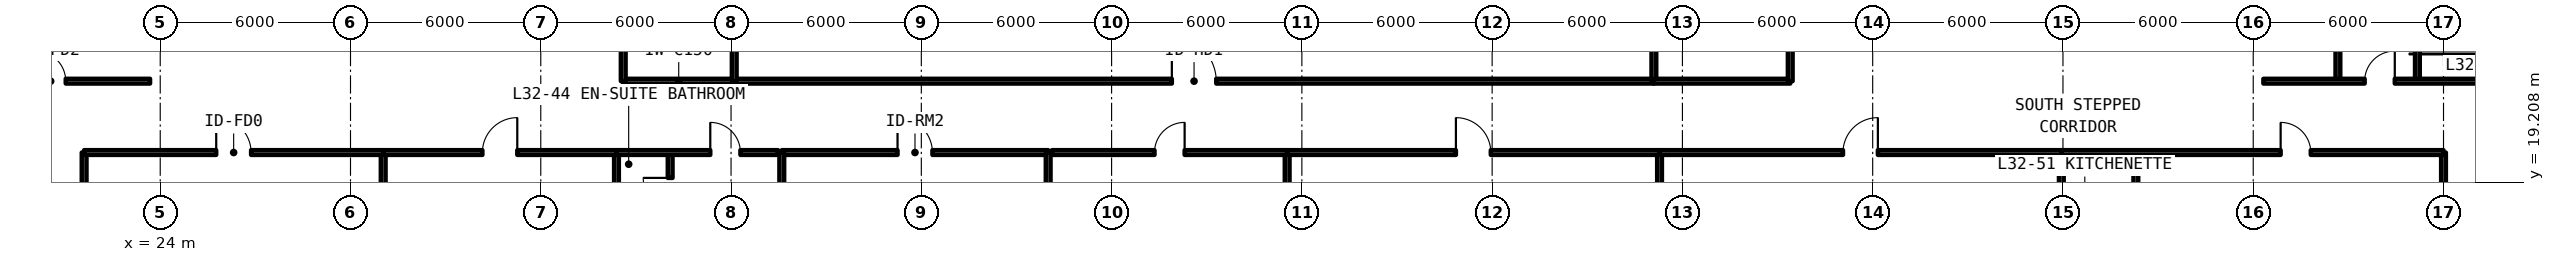
"""IFC4 building model, lengths in metres.
Left out: names, types, materials, properties, quantities, classifications, styles, units other than length and angle.
Written with IfcOpenShell. Run it as: python <this file> out.ifc"""

import sys

from ifc_helpers import new_model, si_unit, direction, frame, frame_2d, origin, place, context, subcontext, project, spatial, rectangle, extrude, element, fill, save


model = new_model("IFC4")
c1 = context("Model", 3, precision=1e-05, world=origin(), true_north=direction((0.0, 1.0)))
c2 = subcontext(c1, "Body", "Model", "MODEL_VIEW")
j1 = project(units=[si_unit("LENGTHUNIT", "METRE"), si_unit("PLANEANGLEUNIT", "RADIAN")], contexts=[c1])
p1 = place(None, origin())
s1 = spatial("IfcSite", under=j1, at=p1, CompositionType="ELEMENT")
p2 = place(p1, origin())
s2 = spatial("IfcBuilding", under=s1, at=p2, CompositionType="ELEMENT")
p3 = place(p2, frame((0.0, 0.0, 115.83)))
s3 = spatial("IfcBuildingStorey", under=s2, at=p3, CompositionType="ELEMENT", Elevation=115.83)
p4 = place(p3, frame((38.6, 22.4, 0.0), z_axis=(0.0, 0.0, 1.0), x_axis=(1.0, 0.0, 0.0)))
e1 = element("IfcWall", 1, at=p4, inside=s3, PredefinedType="SOLIDWALL", context=c2, shape_type="SweptSolid", body=[
    extrude(rectangle(XDim=3.5, YDim=0.15, at=frame_2d((1.75, 0.0))), origin(), (0.0, 0.0, 1.0), 2.63),
])
p5 = place(p3, frame((38.6, 22.4, 0.0), z_axis=(0.0, 0.0, 1.0), x_axis=(0.0, 1.0, 0.0)))
e2 = element("IfcWall", 2, at=p5, inside=s3, PredefinedType="SOLIDWALL", context=c2, shape_type="SweptSolid", body=[
    extrude(rectangle(XDim=9.0, YDim=0.15, at=frame_2d((4.5, 0.0))), origin(), (0.0, 0.0, 1.0), 2.63),
])
p6 = place(p5, frame((4.025, 0.0, 0.0)))
e3 = element("IfcOpeningElement", 3, at=p6, cuts=e2, PredefinedType="OPENING", context=c2, shape_type="SweptSolid", body=[
    extrude(rectangle(XDim=0.95, YDim=2.15, at=frame_2d((0.475, 1.075))), frame((0.0, 0.085, 0.0), z_axis=(0.0, -1.0, 0.0), x_axis=(1.0, 0.0, 0.0)), (0.0, 0.0, 1.0), 0.17),
])
p7 = place(p3, frame((42.1, 22.4, 0.0), z_axis=(0.0, 0.0, 1.0), x_axis=(1.0, 0.0, 0.0)))
e4 = element("IfcWall", 4, at=p7, inside=s3, PredefinedType="SOLIDWALL", context=c2, shape_type="SweptSolid", body=[
    extrude(rectangle(XDim=29.0, YDim=0.15, at=frame_2d((14.5, 0.0))), origin(), (0.0, 0.0, 1.0), 2.63),
])
p8 = place(p7, frame((13.8, 0.0, 0.0)))
e5 = element("IfcOpeningElement", 5, at=p8, cuts=e4, PredefinedType="OPENING", context=c2, shape_type="SweptSolid", body=[
    extrude(rectangle(XDim=1.4, YDim=2.15, at=frame_2d((0.7, 1.075))), frame((0.0, 0.085, 0.0), z_axis=(0.0, -1.0, 0.0), x_axis=(1.0, 0.0, 0.0)), (0.0, 0.0, 1.0), 0.17),
])
for number, where, z_axis, x_axis in (
    (6, (42.1, 22.4, 0.0), (0.0, 0.0, 1.0), (0.0, 1.0, 0.0)),
    (7, (71.1, 22.4, 0.0), (0.0, 0.0, 1.0), (0.0, 1.0, 0.0)),
):
    element("IfcWall", number, at=place(p3, frame(where, z_axis=z_axis, x_axis=x_axis)), inside=s3, PredefinedType="SOLIDWALL", context=c2, shape_type="SweptSolid", body=[
        extrude(rectangle(XDim=22.4, YDim=0.15, at=frame_2d((11.2, 0.0))), origin(), (0.0, 0.0, 1.0), 2.63),
    ])
p9 = place(p3, frame((71.1, 22.4, 0.0), z_axis=(0.0, 0.0, 1.0), x_axis=(1.0, 0.0, 0.0)))
e8 = element("IfcWall", 8, at=p9, inside=s3, PredefinedType="SOLIDWALL", context=c2, shape_type="SweptSolid", body=[
    extrude(rectangle(XDim=4.3, YDim=0.15, at=frame_2d((2.15, 0.0))), origin(), (0.0, 0.0, 1.0), 2.63),
])
p10 = place(p3, frame((75.4, 22.4, 0.0), z_axis=(0.0, 0.0, 1.0), x_axis=(0.0, 1.0, 0.0)))
e9 = element("IfcWall", 9, at=p10, inside=s3, PredefinedType="SOLIDWALL", context=c2, shape_type="SweptSolid", body=[
    extrude(rectangle(XDim=13.2, YDim=0.15, at=frame_2d((6.6, 0.0))), origin(), (0.0, 0.0, 1.0), 2.63),
])
p11 = place(p10, frame((6.125, 0.0, 0.0)))
e10 = element("IfcOpeningElement", 10, at=p11, cuts=e9, PredefinedType="OPENING", context=c2, shape_type="SweptSolid", body=[
    extrude(rectangle(XDim=0.95, YDim=2.15, at=frame_2d((0.475, 1.075))), frame((0.0, 0.085, 0.0), z_axis=(0.0, -1.0, 0.0), x_axis=(1.0, 0.0, 0.0)), (0.0, 0.0, 1.0), 0.17),
])
p12 = place(p3, frame((17.41, 22.4, 0.0), z_axis=(0.0, 0.0, 1.0), x_axis=(1.0, 0.0, 0.0)))
e11 = element("IfcWall", 11, at=p12, inside=s3, PredefinedType="SOLIDWALL", context=c2, shape_type="SweptSolid", body=[
    extrude(rectangle(XDim=6.27, YDim=0.15, at=frame_2d((3.135, 0.0))), origin(), (0.0, 0.0, 1.0), 2.63),
])
p13 = place(p12, frame((2.66, 0.0, 0.0)))
e12 = element("IfcOpeningElement", 12, at=p13, cuts=e11, PredefinedType="OPENING", context=c2, shape_type="SweptSolid", body=[
    extrude(rectangle(XDim=0.95, YDim=2.15, at=frame_2d((0.475, 1.075))), frame((0.0, 0.085, 0.0), z_axis=(0.0, -1.0, 0.0), x_axis=(1.0, 0.0, 0.0)), (0.0, 0.0, 1.0), 0.17),
])
p14 = place(p3, frame((95.177, 22.4, 0.0), z_axis=(0.0, 0.0, 1.0), x_axis=(0.0, 1.0, 0.0)))
e13 = element("IfcWall", 13, at=p14, inside=s3, PredefinedType="PARTITIONING", context=c2, shape_type="SweptSolid", body=[
    extrude(rectangle(XDim=17.2, YDim=0.15, at=frame_2d((8.6, 0.0))), origin(), (0.0, 0.0, 1.0), 2.63),
])
p15 = place(p14, frame((8.175, 0.0, 0.0)))
e14 = element("IfcOpeningElement", 14, at=p15, cuts=e13, PredefinedType="OPENING", context=c2, shape_type="SweptSolid", body=[
    extrude(rectangle(XDim=0.85, YDim=2.1, at=frame_2d((0.425, 1.05))), frame((0.0, 0.085, 0.0), z_axis=(0.0, -1.0, 0.0), x_axis=(1.0, 0.0, 0.0)), (0.0, 0.0, 1.0), 0.17),
])
p16 = place(p3, frame((92.67, 22.4, 0.0), z_axis=(0.0, 0.0, 1.0), x_axis=(0.0, 1.0, 0.0)))
e15 = element("IfcWall", 15, at=p16, inside=s3, PredefinedType="PARTITIONING", context=c2, shape_type="SweptSolid", body=[
    extrude(rectangle(XDim=17.2, YDim=0.15, at=frame_2d((8.6, 0.0))), origin(), (0.0, 0.0, 1.0), 2.63),
])
p17 = place(p16, frame((4.649, 0.0, 0.0)))
e16 = element("IfcOpeningElement", 16, at=p17, cuts=e15, PredefinedType="OPENING", context=c2, shape_type="SweptSolid", body=[
    extrude(rectangle(XDim=0.85, YDim=2.1, at=frame_2d((0.425, 1.05))), frame((0.0, 0.085, 0.0), z_axis=(0.0, -1.0, 0.0), x_axis=(1.0, 0.0, 0.0)), (0.0, 0.0, 1.0), 0.17),
])
p18 = place(p16, frame((13.249, 0.0, 0.0)))
e17 = element("IfcOpeningElement", 17, at=p18, cuts=e15, PredefinedType="OPENING", context=c2, shape_type="SweptSolid", body=[
    extrude(rectangle(XDim=0.85, YDim=2.1, at=frame_2d((0.425, 1.05))), frame((0.0, 0.085, 0.0), z_axis=(0.0, -1.0, 0.0), x_axis=(1.0, 0.0, 0.0)), (0.0, 0.0, 1.0), 0.17),
])
p19 = place(p3, frame((90.32, 22.4, 0.0), z_axis=(0.0, 0.0, 1.0), x_axis=(1.0, 0.0, 0.0)))
e18 = element("IfcWall", 18, at=p19, inside=s3, PredefinedType="SOLIDWALL", context=c2, shape_type="SweptSolid", body=[
    extrude(rectangle(XDim=9.87, YDim=0.15, at=frame_2d((4.935, 0.0))), origin(), (0.0, 0.0, 1.0), 2.63),
])
p20 = place(p19, frame((3.193, 0.0, 0.0)))
e19 = element("IfcOpeningElement", 19, at=p20, cuts=e18, PredefinedType="OPENING", context=c2, shape_type="SweptSolid", body=[
    extrude(rectangle(XDim=0.95, YDim=2.15, at=frame_2d((0.475, 1.075))), frame((0.0, 0.085, 0.0), z_axis=(0.0, -1.0, 0.0), x_axis=(1.0, 0.0, 0.0)), (0.0, 0.0, 1.0), 0.17),
])
p21 = place(p3, frame((43.6, 20.15, 0.0), z_axis=(0.0, 0.0, 1.0), x_axis=(1.0, 0.0, 0.0)))
e20 = element("IfcWall", 20, at=p21, inside=s3, PredefinedType="SOLIDWALL", context=c2, shape_type="SweptSolid", body=[
    extrude(rectangle(XDim=8.4, YDim=0.15, at=frame_2d((4.2, 0.0))), origin(), (0.0, 0.0, 1.0), 2.63),
])
p22 = place(p21, frame((3.65, 0.0, 0.0)))
e21 = element("IfcOpeningElement", 21, at=p22, cuts=e20, PredefinedType="OPENING", context=c2, shape_type="SweptSolid", body=[
    extrude(rectangle(XDim=1.1, YDim=2.15, at=frame_2d((0.55, 1.075))), frame((0.0, 0.085, 0.0), z_axis=(0.0, -1.0, 0.0), x_axis=(1.0, 0.0, 0.0)), (0.0, 0.0, 1.0), 0.17),
])
for number, where, z_axis, x_axis in (
    (22, (43.6, 9.85, 0.0), (0.0, 0.0, 1.0), (0.0, 1.0, 0.0)),
    (23, (52.0, 9.85, 0.0), (0.0, 0.0, 1.0), (0.0, 1.0, 0.0)),
    (24, (21.6, 9.85, 0.0), (0.0, 0.0, 1.0), (0.0, 1.0, 0.0)),
    (25, (31.031, 9.85, 0.0), (0.0, 0.0, 1.0), (0.0, 1.0, 0.0)),
):
    element("IfcWall", number, at=place(p3, frame(where, z_axis=z_axis, x_axis=x_axis)), inside=s3, PredefinedType="SOLIDWALL", context=c2, shape_type="SweptSolid", body=[
        extrude(rectangle(XDim=10.3, YDim=0.15, at=frame_2d((5.15, 0.0))), origin(), (0.0, 0.0, 1.0), 2.63),
    ])
p23 = place(p3, frame((21.6, 20.15, 0.0), z_axis=(0.0, 0.0, 1.0), x_axis=(1.0, 0.0, 0.0)))
e26 = element("IfcWall", 26, at=p23, inside=s3, PredefinedType="SOLIDWALL", context=c2, shape_type="SweptSolid", body=[
    extrude(rectangle(XDim=9.431, YDim=0.15, at=frame_2d((4.715, 0.0))), origin(), (0.0, 0.0, 1.0), 2.63),
])
p24 = place(p23, frame((4.166, 0.0, 0.0)))
e27 = element("IfcOpeningElement", 27, at=p24, cuts=e26, PredefinedType="OPENING", context=c2, shape_type="SweptSolid", body=[
    extrude(rectangle(XDim=1.1, YDim=2.15, at=frame_2d((0.55, 1.075))), frame((0.0, 0.085, 0.0), z_axis=(0.0, -1.0, 0.0), x_axis=(1.0, 0.0, 0.0)), (0.0, 0.0, 1.0), 0.17),
])
p25 = place(p3, frame((38.387, 9.85, 0.0), z_axis=(0.0, 0.0, 1.0), x_axis=(0.0, 1.0, 0.0)))
e28 = element("IfcWall", 28, at=p25, inside=s3, PredefinedType="SOLIDWALL", context=c2, shape_type="SweptSolid", body=[
    extrude(rectangle(XDim=10.3, YDim=0.15, at=frame_2d((5.15, 0.0))), origin(), (0.0, 0.0, 1.0), 2.63),
])
p26 = place(p3, frame((31.031, 20.15, 0.0), z_axis=(0.0, 0.0, 1.0), x_axis=(1.0, 0.0, 0.0)))
e29 = element("IfcWall", 29, at=p26, inside=s3, PredefinedType="SOLIDWALL", context=c2, shape_type="SweptSolid", body=[
    extrude(rectangle(XDim=7.356, YDim=0.15, at=frame_2d((3.678, 0.0))), origin(), (0.0, 0.0, 1.0), 2.63),
])
p27 = place(p26, frame((3.128, 0.0, 0.0)))
e30 = element("IfcOpeningElement", 30, at=p27, cuts=e29, PredefinedType="OPENING", context=c2, shape_type="SweptSolid", body=[
    extrude(rectangle(XDim=1.1, YDim=2.15, at=frame_2d((0.55, 1.075))), frame((0.0, 0.085, 0.0), z_axis=(0.0, -1.0, 0.0), x_axis=(1.0, 0.0, 0.0)), (0.0, 0.0, 1.0), 0.17),
])
p28 = place(p3, frame((40.08, 9.85, 0.0), z_axis=(0.0, 0.0, 1.0), x_axis=(0.0, 1.0, 0.0)))
e31 = element("IfcWall", 31, at=p28, inside=s3, PredefinedType="PARTITIONING", context=c2, shape_type="SweptSolid", body=[
    extrude(rectangle(XDim=10.3, YDim=0.15, at=frame_2d((5.15, 0.0))), origin(), (0.0, 0.0, 1.0), 2.63),
])
p29 = place(p28, frame((3.0, 0.0, 0.0)))
e32 = element("IfcOpeningElement", 32, at=p29, cuts=e31, PredefinedType="OPENING", context=c2, shape_type="SweptSolid", body=[
    extrude(rectangle(XDim=0.85, YDim=2.1, at=frame_2d((0.425, 1.05))), frame((0.0, 0.085, 0.0), z_axis=(0.0, -1.0, 0.0), x_axis=(1.0, 0.0, 0.0)), (0.0, 0.0, 1.0), 0.17),
])
p30 = place(p28, frame((8.65, 0.0, 0.0)))
e33 = element("IfcOpeningElement", 33, at=p30, cuts=e31, PredefinedType="OPENING", context=c2, shape_type="SweptSolid", body=[
    extrude(rectangle(XDim=0.85, YDim=2.1, at=frame_2d((0.425, 1.05))), frame((0.0, 0.085, 0.0), z_axis=(0.0, -1.0, 0.0), x_axis=(1.0, 0.0, 0.0)), (0.0, 0.0, 1.0), 0.17),
])
p31 = place(p3, frame((38.387, 20.15, 0.0), z_axis=(0.0, 0.0, 1.0), x_axis=(1.0, 0.0, 0.0)))
e34 = element("IfcWall", 34, at=p31, inside=s3, PredefinedType="SOLIDWALL", context=c2, shape_type="SweptSolid", body=[
    extrude(rectangle(XDim=5.093, YDim=0.15, at=frame_2d((2.546, 0.0))), origin(), (0.0, 0.0, 1.0), 2.63),
])
p32 = place(p31, frame((2.958, 0.0, 0.0)))
e35 = element("IfcOpeningElement", 35, at=p32, cuts=e34, PredefinedType="OPENING", context=c2, shape_type="SweptSolid", body=[
    extrude(rectangle(XDim=0.95, YDim=2.15, at=frame_2d((0.475, 1.075))), frame((0.0, 0.085, 0.0), z_axis=(0.0, -1.0, 0.0), x_axis=(1.0, 0.0, 0.0)), (0.0, 0.0, 1.0), 0.17),
])
for number, where, z_axis, x_axis in (
    (36, (96.0, 9.85, 0.0), (0.0, 0.0, 1.0), (0.0, 1.0, 0.0)),
    (37, (59.536, 9.85, 0.0), (0.0, 0.0, 1.0), (0.0, 1.0, 0.0)),
):
    element("IfcWall", number, at=place(p3, frame(where, z_axis=z_axis, x_axis=x_axis)), inside=s3, PredefinedType="SOLIDWALL", context=c2, shape_type="SweptSolid", body=[
        extrude(rectangle(XDim=10.3, YDim=0.15, at=frame_2d((5.15, 0.0))), origin(), (0.0, 0.0, 1.0), 2.63),
    ])
p33 = place(p3, frame((52.12, 20.15, 0.0), z_axis=(0.0, 0.0, 1.0), x_axis=(1.0, 0.0, 0.0)))
e38 = element("IfcWall", 38, at=p33, inside=s3, PredefinedType="SOLIDWALL", context=c2, shape_type="SweptSolid", body=[
    extrude(rectangle(XDim=7.416, YDim=0.15, at=frame_2d((3.708, 0.0))), origin(), (0.0, 0.0, 1.0), 2.63),
])
p34 = place(p33, frame((3.233, 0.0, 0.0)))
e39 = element("IfcOpeningElement", 39, at=p34, cuts=e38, PredefinedType="OPENING", context=c2, shape_type="SweptSolid", body=[
    extrude(rectangle(XDim=0.95, YDim=2.15, at=frame_2d((0.475, 1.075))), frame((0.0, 0.085, 0.0), z_axis=(0.0, -1.0, 0.0), x_axis=(1.0, 0.0, 0.0)), (0.0, 0.0, 1.0), 0.17),
])
p35 = place(p3, frame((71.279, 9.85, 0.0), z_axis=(0.0, 0.0, 1.0), x_axis=(0.0, 1.0, 0.0)))
e40 = element("IfcWall", 40, at=p35, inside=s3, PredefinedType="SOLIDWALL", context=c2, shape_type="SweptSolid", body=[
    extrude(rectangle(XDim=10.3, YDim=0.15, at=frame_2d((5.15, 0.0))), origin(), (0.0, 0.0, 1.0), 2.63),
])
p36 = place(p3, frame((59.536, 20.15, 0.0), z_axis=(0.0, 0.0, 1.0), x_axis=(1.0, 0.0, 0.0)))
e41 = element("IfcWall", 41, at=p36, inside=s3, PredefinedType="SOLIDWALL", context=c2, shape_type="SweptSolid", body=[
    extrude(rectangle(XDim=11.742, YDim=0.15, at=frame_2d((5.871, 0.0))), origin(), (0.0, 0.0, 1.0), 2.63),
])
p37 = place(p36, frame((5.321, 0.0, 0.0)))
e42 = element("IfcOpeningElement", 42, at=p37, cuts=e41, PredefinedType="OPENING", context=c2, shape_type="SweptSolid", body=[
    extrude(rectangle(XDim=1.1, YDim=2.15, at=frame_2d((0.55, 1.075))), frame((0.0, 0.085, 0.0), z_axis=(0.0, -1.0, 0.0), x_axis=(1.0, 0.0, 0.0)), (0.0, 0.0, 1.0), 0.17),
])
p38 = place(p3, frame((83.948, 9.85, 0.0), z_axis=(0.0, 0.0, 1.0), x_axis=(0.0, 1.0, 0.0)))
e43 = element("IfcWall", 43, at=p38, inside=s3, PredefinedType="SOLIDWALL", context=c2, shape_type="SweptSolid", body=[
    extrude(rectangle(XDim=10.3, YDim=0.15, at=frame_2d((5.15, 0.0))), origin(), (0.0, 0.0, 1.0), 2.63),
])
p39 = place(p3, frame((71.279, 20.15, 0.0), z_axis=(0.0, 0.0, 1.0), x_axis=(1.0, 0.0, 0.0)))
e44 = element("IfcWall", 44, at=p39, inside=s3, PredefinedType="SOLIDWALL", context=c2, shape_type="SweptSolid", body=[
    extrude(rectangle(XDim=12.67, YDim=0.15, at=frame_2d((6.335, 0.0))), origin(), (0.0, 0.0, 1.0), 2.63),
])
p40 = place(p39, frame((5.785, 0.0, 0.0)))
e45 = element("IfcOpeningElement", 45, at=p40, cuts=e44, PredefinedType="OPENING", context=c2, shape_type="SweptSolid", body=[
    extrude(rectangle(XDim=1.1, YDim=2.15, at=frame_2d((0.55, 1.075))), frame((0.0, 0.085, 0.0), z_axis=(0.0, -1.0, 0.0), x_axis=(1.0, 0.0, 0.0)), (0.0, 0.0, 1.0), 0.17),
])
p41 = place(p3, frame((86.298, 14.557, 0.0), z_axis=(0.0, 0.0, 1.0), x_axis=(0.0, 1.0, 0.0)))
e46 = element("IfcWall", 46, at=p41, inside=s3, PredefinedType="PARTITIONING", context=c2, shape_type="SweptSolid", body=[
    extrude(rectangle(XDim=5.593, YDim=0.15, at=frame_2d((2.796, 0.0))), origin(), (0.0, 0.0, 1.0), 2.63),
])
p42 = place(p41, frame((0.721, 0.0, 0.0)))
e47 = element("IfcOpeningElement", 47, at=p42, cuts=e46, PredefinedType="OPENING", context=c2, shape_type="SweptSolid", body=[
    extrude(rectangle(XDim=0.85, YDim=2.1, at=frame_2d((0.425, 1.05))), frame((0.0, 0.085, 0.0), z_axis=(0.0, -1.0, 0.0), x_axis=(1.0, 0.0, 0.0)), (0.0, 0.0, 1.0), 0.17),
])
p43 = place(p41, frame((3.518, 0.0, 0.0)))
e48 = element("IfcOpeningElement", 48, at=p43, cuts=e46, PredefinedType="OPENING", context=c2, shape_type="SweptSolid", body=[
    extrude(rectangle(XDim=0.85, YDim=2.1, at=frame_2d((0.425, 1.05))), frame((0.0, 0.085, 0.0), z_axis=(0.0, -1.0, 0.0), x_axis=(1.0, 0.0, 0.0)), (0.0, 0.0, 1.0), 0.17),
])
p44 = place(p3, frame((83.948, 20.15, 0.0), z_axis=(0.0, 0.0, 1.0), x_axis=(1.0, 0.0, 0.0)))
e49 = element("IfcWall", 49, at=p44, inside=s3, PredefinedType="SOLIDWALL", context=c2, shape_type="SweptSolid", body=[
    extrude(rectangle(XDim=12.052, YDim=0.15, at=frame_2d((6.026, 0.0))), origin(), (0.0, 0.0, 1.0), 2.63),
])
p45 = place(p44, frame((6.916, 0.0, 0.0)))
e50 = element("IfcOpeningElement", 50, at=p45, cuts=e49, PredefinedType="OPENING", context=c2, shape_type="SweptSolid", body=[
    extrude(rectangle(XDim=0.95, YDim=2.15, at=frame_2d((0.475, 1.075))), frame((0.0, 0.085, 0.0), z_axis=(0.0, -1.0, 0.0), x_axis=(1.0, 0.0, 0.0)), (0.0, 0.0, 1.0), 0.17),
])
p46 = place(p8, origin())
e51 = element("IfcDoor", 51, at=p46, inside=s3, OperationType="SINGLE_SWING_RIGHT", PredefinedType="DOOR", context=c2, shape_type="SweptSolid", body=[
    extrude(rectangle(XDim=1.4, YDim=2.15, at=frame_2d((0.7, 1.075))), frame((0.0, 0.025, 0.0), z_axis=(0.0, -1.0, 0.0), x_axis=(1.0, 0.0, 0.0)), (0.0, 0.0, 1.0), 0.05),
])
fill(e5, e51)
p47 = place(p13, origin())
e52 = element("IfcDoor", 52, at=p47, inside=s3, OperationType="SINGLE_SWING_LEFT", PredefinedType="DOOR", context=c2, shape_type="SweptSolid", body=[
    extrude(rectangle(XDim=0.95, YDim=2.15, at=frame_2d((0.475, 1.075))), frame((0.0, 0.025, 0.0), z_axis=(0.0, -1.0, 0.0), x_axis=(1.0, 0.0, 0.0)), (0.0, 0.0, 1.0), 0.05),
])
fill(e12, e52)
p48 = place(p20, origin())
e53 = element("IfcDoor", 53, at=p48, inside=s3, OperationType="SINGLE_SWING_RIGHT", PredefinedType="DOOR", context=c2, shape_type="SweptSolid", body=[
    extrude(rectangle(XDim=0.95, YDim=2.15, at=frame_2d((0.475, 1.075))), frame((0.0, 0.025, 0.0), z_axis=(0.0, -1.0, 0.0), x_axis=(1.0, 0.0, 0.0)), (0.0, 0.0, 1.0), 0.05),
])
fill(e19, e53)
p49 = place(p22, origin())
e54 = element("IfcDoor", 54, at=p49, inside=s3, OperationType="SINGLE_SWING_LEFT", PredefinedType="DOOR", context=c2, shape_type="SweptSolid", body=[
    extrude(rectangle(XDim=1.1, YDim=2.15, at=frame_2d((0.55, 1.075))), frame((0.0, 0.025, 0.0), z_axis=(0.0, -1.0, 0.0), x_axis=(1.0, 0.0, 0.0)), (0.0, 0.0, 1.0), 0.05),
])
fill(e21, e54)
p50 = place(p24, origin())
e55 = element("IfcDoor", 55, at=p50, inside=s3, OperationType="SINGLE_SWING_LEFT", PredefinedType="DOOR", context=c2, shape_type="SweptSolid", body=[
    extrude(rectangle(XDim=1.1, YDim=2.15, at=frame_2d((0.55, 1.075))), frame((0.0, 0.025, 0.0), z_axis=(0.0, -1.0, 0.0), x_axis=(1.0, 0.0, 0.0)), (0.0, 0.0, 1.0), 0.05),
])
fill(e27, e55)
p51 = place(p27, origin())
e56 = element("IfcDoor", 56, at=p51, inside=s3, OperationType="SINGLE_SWING_RIGHT", PredefinedType="DOOR", context=c2, shape_type="SweptSolid", body=[
    extrude(rectangle(XDim=1.1, YDim=2.15, at=frame_2d((0.55, 1.075))), frame((0.0, 0.025, 0.0), z_axis=(0.0, -1.0, 0.0), x_axis=(1.0, 0.0, 0.0)), (0.0, 0.0, 1.0), 0.05),
])
fill(e30, e56)
p52 = place(p30, origin())
e57 = element("IfcDoor", 57, at=p52, inside=s3, OperationType="SINGLE_SWING_RIGHT", PredefinedType="DOOR", context=c2, shape_type="SweptSolid", body=[
    extrude(rectangle(XDim=0.85, YDim=2.1, at=frame_2d((0.425, 1.05))), frame((0.0, 0.025, 0.0), z_axis=(0.0, -1.0, 0.0), x_axis=(1.0, 0.0, 0.0)), (0.0, 0.0, 1.0), 0.05),
])
fill(e33, e57)
p53 = place(p32, origin())
e58 = element("IfcDoor", 58, at=p53, inside=s3, OperationType="SINGLE_SWING_LEFT", PredefinedType="DOOR", context=c2, shape_type="SweptSolid", body=[
    extrude(rectangle(XDim=0.95, YDim=2.15, at=frame_2d((0.475, 1.075))), frame((0.0, 0.025, 0.0), z_axis=(0.0, -1.0, 0.0), x_axis=(1.0, 0.0, 0.0)), (0.0, 0.0, 1.0), 0.05),
])
fill(e35, e58)
p54 = place(p34, origin())
e59 = element("IfcDoor", 59, at=p54, inside=s3, OperationType="SINGLE_SWING_RIGHT", PredefinedType="DOOR", context=c2, shape_type="SweptSolid", body=[
    extrude(rectangle(XDim=0.95, YDim=2.15, at=frame_2d((0.475, 1.075))), frame((0.0, 0.025, 0.0), z_axis=(0.0, -1.0, 0.0), x_axis=(1.0, 0.0, 0.0)), (0.0, 0.0, 1.0), 0.05),
])
fill(e39, e59)
p55 = place(p37, origin())
e60 = element("IfcDoor", 60, at=p55, inside=s3, OperationType="SINGLE_SWING_LEFT", PredefinedType="DOOR", context=c2, shape_type="SweptSolid", body=[
    extrude(rectangle(XDim=1.1, YDim=2.15, at=frame_2d((0.55, 1.075))), frame((0.0, 0.025, 0.0), z_axis=(0.0, -1.0, 0.0), x_axis=(1.0, 0.0, 0.0)), (0.0, 0.0, 1.0), 0.05),
])
fill(e42, e60)
p56 = place(p40, origin())
e61 = element("IfcDoor", 61, at=p56, inside=s3, OperationType="SINGLE_SWING_RIGHT", PredefinedType="DOOR", context=c2, shape_type="SweptSolid", body=[
    extrude(rectangle(XDim=1.1, YDim=2.15, at=frame_2d((0.55, 1.075))), frame((0.0, 0.025, 0.0), z_axis=(0.0, -1.0, 0.0), x_axis=(1.0, 0.0, 0.0)), (0.0, 0.0, 1.0), 0.05),
])
fill(e45, e61)
p57 = place(p45, origin())
e62 = element("IfcDoor", 62, at=p57, inside=s3, OperationType="SINGLE_SWING_LEFT", PredefinedType="DOOR", context=c2, shape_type="SweptSolid", body=[
    extrude(rectangle(XDim=0.95, YDim=2.15, at=frame_2d((0.475, 1.075))), frame((0.0, 0.025, 0.0), z_axis=(0.0, -1.0, 0.0), x_axis=(1.0, 0.0, 0.0)), (0.0, 0.0, 1.0), 0.05),
])
fill(e50, e62)
save(model, sys.argv[1])
